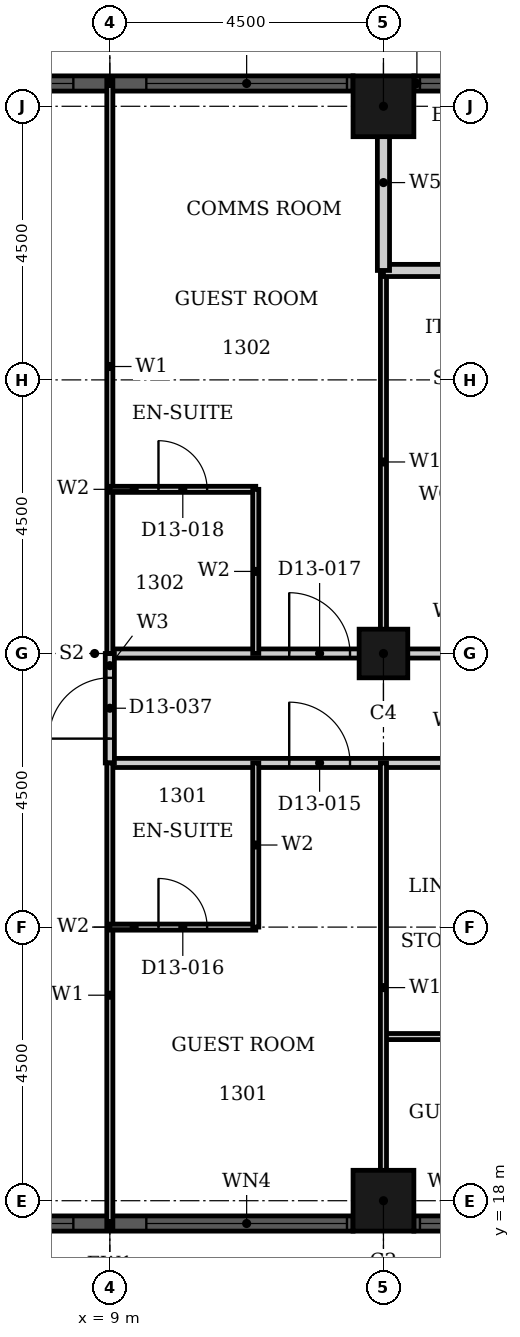
"""IFC4 building model, lengths in metres.
Left out: names, types, materials, properties, quantities, classifications, styles, units other than length and angle.
Written with IfcOpenShell. Run it as: python <this file> out.ifc"""

import sys

from ifc_helpers import new_model, si_unit, direction, frame, frame_2d, origin, origin_2d, place, context, subcontext, project, spatial, rectangle, hollow_rectangle, extrude, element, fill, save


model = new_model("IFC4")
c1 = context("Model", 3, precision=1e-05, world=origin(), true_north=direction((0.0, 1.0)))
c2 = subcontext(c1, "Body", "Model", "MODEL_VIEW")
j1 = project(units=[si_unit("LENGTHUNIT", "METRE"), si_unit("PLANEANGLEUNIT", "RADIAN")], contexts=[c1])
p1 = place(None, origin())
s1 = spatial("IfcSite", under=j1, at=p1, CompositionType="ELEMENT")
p2 = place(p1, origin())
s2 = spatial("IfcBuilding", under=s1, at=p2, CompositionType="ELEMENT")
p3 = place(p2, frame((0.0, 0.0, 60.0)))
s3 = spatial("IfcBuildingStorey", under=s2, at=p3, CompositionType="ELEMENT", Elevation=60.0)
for number, where, z_axis, x_axis in (
    (1, (13.5, 36.0, 0.0), (0.0, 0.0, 1.0), (1.0, 0.0, 0.0)),
    (2, (13.5, 18.0, 0.0), (0.0, 0.0, 1.0), (1.0, 0.0, 0.0)),
):
    element("IfcColumn", number, at=place(p3, frame(where, z_axis=z_axis, x_axis=x_axis)), inside=s3, PredefinedType="COLUMN", context=c2, shape_type="SweptSolid", body=[
        extrude(hollow_rectangle(XDim=1.0, YDim=1.0, WallThickness=0.032, at=origin_2d()), origin(), (0.0, 0.0, 1.0), 3.6),
    ])
p4 = place(p3, frame((13.5, 27.0, 0.0), z_axis=(0.0, 0.0, 1.0), x_axis=(1.0, 0.0, 0.0)))
e3 = element("IfcColumn", 3, at=p4, inside=s3, PredefinedType="COLUMN", context=c2, shape_type="SweptSolid", body=[
    extrude(hollow_rectangle(XDim=0.8, YDim=0.8, WallThickness=0.025, at=origin_2d()), origin(), (0.0, 0.0, 1.0), 3.6),
])
p5 = place(p3, frame((15.25, 36.375, 0.0), z_axis=(0.0, 0.0, 1.0), x_axis=(-1.0, 0.0, 0.0)))
e4 = element("IfcWall", 4, at=p5, inside=s3, PredefinedType="SOLIDWALL", context=c2, shape_type="SweptSolid", body=[
    extrude(rectangle(XDim=1.25, YDim=0.25, at=frame_2d((0.625, 0.0))), origin(), (0.0, 0.0, 1.0), 3.6),
])
p6 = place(p5, frame((0.1, 0.0, 0.9)))
e5 = element("IfcOpeningElement", 5, at=p6, cuts=e4, PredefinedType="OPENING", context=c2, shape_type="SweptSolid", body=[
    extrude(rectangle(XDim=1.05, YDim=2.08, at=frame_2d((0.525, 1.04))), frame((0.0, 0.135, 0.0), z_axis=(0.0, -1.0, 0.0), x_axis=(1.0, 0.0, 0.0)), (0.0, 0.0, 1.0), 0.27),
])
p7 = place(p3, frame((13.0, 36.375, 0.0), z_axis=(0.0, 0.0, 1.0), x_axis=(-1.0, 0.0, 0.0)))
e6 = element("IfcWall", 6, at=p7, inside=s3, PredefinedType="SOLIDWALL", context=c2, shape_type="SweptSolid", body=[
    extrude(rectangle(XDim=8.0, YDim=0.25, at=frame_2d((4.0, 0.0))), origin(), (0.0, 0.0, 1.0), 3.6),
])
p8 = place(p7, frame((0.1, 0.0, 0.9)))
e7 = element("IfcOpeningElement", 7, at=p8, cuts=e6, PredefinedType="OPENING", context=c2, shape_type="SweptSolid", body=[
    extrude(rectangle(XDim=3.3, YDim=2.08, at=frame_2d((1.65, 1.04))), frame((0.0, 0.135, 0.0), z_axis=(0.0, -1.0, 0.0), x_axis=(1.0, 0.0, 0.0)), (0.0, 0.0, 1.0), 0.27),
])
p9 = place(p7, frame((4.6, 0.0, 0.9)))
e8 = element("IfcOpeningElement", 8, at=p9, cuts=e6, PredefinedType="OPENING", context=c2, shape_type="SweptSolid", body=[
    extrude(rectangle(XDim=3.3, YDim=2.08, at=frame_2d((1.65, 1.04))), frame((0.0, 0.135, 0.0), z_axis=(0.0, -1.0, 0.0), x_axis=(1.0, 0.0, 0.0)), (0.0, 0.0, 1.0), 0.27),
])
p10 = place(p3, frame((5.0, 17.625, 0.0), z_axis=(0.0, 0.0, 1.0), x_axis=(1.0, 0.0, 0.0)))
e9 = element("IfcWall", 9, at=p10, inside=s3, PredefinedType="SOLIDWALL", context=c2, shape_type="SweptSolid", body=[
    extrude(rectangle(XDim=8.0, YDim=0.25, at=frame_2d((4.0, 0.0))), origin(), (0.0, 0.0, 1.0), 3.6),
])
p11 = place(p10, frame((0.1, 0.0, 0.9)))
e10 = element("IfcOpeningElement", 10, at=p11, cuts=e9, PredefinedType="OPENING", context=c2, shape_type="SweptSolid", body=[
    extrude(rectangle(XDim=3.3, YDim=2.08, at=frame_2d((1.65, 1.04))), frame((0.0, 0.135, 0.0), z_axis=(0.0, -1.0, 0.0), x_axis=(1.0, 0.0, 0.0)), (0.0, 0.0, 1.0), 0.27),
])
p12 = place(p10, frame((4.6, 0.0, 0.9)))
e11 = element("IfcOpeningElement", 11, at=p12, cuts=e9, PredefinedType="OPENING", context=c2, shape_type="SweptSolid", body=[
    extrude(rectangle(XDim=3.3, YDim=2.08, at=frame_2d((1.65, 1.04))), frame((0.0, 0.135, 0.0), z_axis=(0.0, -1.0, 0.0), x_axis=(1.0, 0.0, 0.0)), (0.0, 0.0, 1.0), 0.27),
])
p13 = place(p3, frame((14.0, 17.625, 0.0), z_axis=(0.0, 0.0, 1.0), x_axis=(1.0, 0.0, 0.0)))
e12 = element("IfcWall", 12, at=p13, inside=s3, PredefinedType="SOLIDWALL", context=c2, shape_type="SweptSolid", body=[
    extrude(rectangle(XDim=1.25, YDim=0.25, at=frame_2d((0.625, 0.0))), origin(), (0.0, 0.0, 1.0), 3.6),
])
p14 = place(p13, frame((0.1, 0.0, 0.9)))
e13 = element("IfcOpeningElement", 13, at=p14, cuts=e12, PredefinedType="OPENING", context=c2, shape_type="SweptSolid", body=[
    extrude(rectangle(XDim=1.05, YDim=2.08, at=frame_2d((0.525, 1.04))), frame((0.0, 0.135, 0.0), z_axis=(0.0, -1.0, 0.0), x_axis=(1.0, 0.0, 0.0)), (0.0, 0.0, 1.0), 0.27),
])
p15 = place(p3, frame((9.0, 25.2, 0.0), z_axis=(0.0, 0.0, 1.0), x_axis=(1.0, 0.0, 0.0)))
e14 = element("IfcWall", 14, at=p15, inside=s3, PredefinedType="PARTITIONING", context=c2, shape_type="SweptSolid", body=[
    extrude(rectangle(XDim=7.2, YDim=0.15, at=frame_2d((3.6, 0.0))), origin(), (0.0, 0.0, 1.0), 3.3),
])
p16 = place(p15, frame((2.95, 0.0, 0.0)))
e15 = element("IfcOpeningElement", 15, at=p16, cuts=e14, PredefinedType="OPENING", context=c2, shape_type="SweptSolid", body=[
    extrude(rectangle(XDim=1.0, YDim=2.1, at=frame_2d((0.5, 1.05))), frame((0.0, 0.085, 0.0), z_axis=(0.0, -1.0, 0.0), x_axis=(1.0, 0.0, 0.0)), (0.0, 0.0, 1.0), 0.17),
])
p17 = place(p3, frame((9.0, 27.0, 0.0), z_axis=(0.0, 0.0, 1.0), x_axis=(1.0, 0.0, 0.0)))
e16 = element("IfcWall", 16, at=p17, inside=s3, PredefinedType="PARTITIONING", context=c2, shape_type="SweptSolid", body=[
    extrude(rectangle(XDim=7.2, YDim=0.15, at=frame_2d((3.6, 0.0))), origin(), (0.0, 0.0, 1.0), 2.58),
])
p18 = place(p17, frame((2.95, 0.0, 0.0)))
e17 = element("IfcOpeningElement", 17, at=p18, cuts=e16, PredefinedType="OPENING", context=c2, shape_type="SweptSolid", body=[
    extrude(rectangle(XDim=1.0, YDim=2.1, at=frame_2d((0.5, 1.05))), frame((0.0, 0.085, 0.0), z_axis=(0.0, -1.0, 0.0), x_axis=(1.0, 0.0, 0.0)), (0.0, 0.0, 1.0), 0.17),
])
p19 = place(p3, frame((9.0, 25.2, 0.0), z_axis=(0.0, 0.0, 1.0), x_axis=(0.0, 1.0, 0.0)))
e18 = element("IfcWall", 18, at=p19, inside=s3, PredefinedType="PARTITIONING", context=c2, shape_type="SweptSolid", body=[
    extrude(rectangle(XDim=1.8, YDim=0.15, at=frame_2d((0.9, 0.0))), origin(), (0.0, 0.0, 1.0), 3.3),
])
p20 = place(p19, frame((0.4, 0.0, 0.0)))
e19 = element("IfcOpeningElement", 19, at=p20, cuts=e18, PredefinedType="OPENING", context=c2, shape_type="SweptSolid", body=[
    extrude(rectangle(XDim=1.0, YDim=2.1, at=frame_2d((0.5, 1.05))), frame((0.0, 0.085, 0.0), z_axis=(0.0, -1.0, 0.0), x_axis=(1.0, 0.0, 0.0)), (0.0, 0.0, 1.0), 0.17),
])
p21 = place(p3, frame((13.5, 20.7, 0.0), z_axis=(0.0, 0.0, 1.0), x_axis=(1.0, 0.0, 0.0)))
e20 = element("IfcWall", 20, at=p21, inside=s3, PredefinedType="PARTITIONING", context=c2, shape_type="SweptSolid", body=[
    extrude(rectangle(XDim=2.7, YDim=0.1, at=frame_2d((1.35, 0.0))), origin(), (0.0, 0.0, 1.0), 3.3),
])
p22 = place(p3, frame((13.5, 27.0, 0.0), z_axis=(0.0, 0.0, 1.0), x_axis=(0.0, 1.0, 0.0)))
e21 = element("IfcWall", 21, at=p22, inside=s3, PredefinedType="PARTITIONING", context=c2, shape_type="SweptSolid", body=[
    extrude(rectangle(XDim=6.3, YDim=0.1, at=frame_2d((3.15, 0.0))), origin(), (0.0, 0.0, 1.0), 2.38),
])
p23 = place(p3, frame((13.5, 17.81, 0.0), z_axis=(0.0, 0.0, 1.0), x_axis=(0.0, 1.0, 0.0)))
e22 = element("IfcWall", 22, at=p23, inside=s3, PredefinedType="PARTITIONING", context=c2, shape_type="SweptSolid", body=[
    extrude(rectangle(XDim=7.39, YDim=0.1, at=frame_2d((3.695, 0.0))), origin(), (0.0, 0.0, 1.0), 2.38),
])
p24 = place(p3, frame((9.0, 27.0, 0.0), z_axis=(0.0, 0.0, 1.0), x_axis=(0.0, 1.0, 0.0)))
e23 = element("IfcWall", 23, at=p24, inside=s3, PredefinedType="PARTITIONING", context=c2, shape_type="SweptSolid", body=[
    extrude(rectangle(XDim=9.44, YDim=0.1, at=frame_2d((4.72, 0.0))), origin(), (0.0, 0.0, 1.0), 3.3),
])
p25 = place(p3, frame((9.0, 17.56, 0.0), z_axis=(0.0, 0.0, 1.0), x_axis=(0.0, 1.0, 0.0)))
e24 = element("IfcWall", 24, at=p25, inside=s3, PredefinedType="PARTITIONING", context=c2, shape_type="SweptSolid", body=[
    extrude(rectangle(XDim=7.64, YDim=0.1, at=frame_2d((3.82, 0.0))), origin(), (0.0, 0.0, 1.0), 3.3),
])
p26 = place(p3, frame((9.0, 22.5, 0.0), z_axis=(0.0, 0.0, 1.0), x_axis=(1.0, 0.0, 0.0)))
e25 = element("IfcWall", 25, at=p26, inside=s3, PredefinedType="PARTITIONING", context=c2, shape_type="SweptSolid", body=[
    extrude(rectangle(XDim=2.4, YDim=0.1, at=frame_2d((1.2, 0.0))), origin(), (0.0, 0.0, 1.0), 2.58),
])
p27 = place(p26, frame((0.8, 0.0, 0.0)))
e26 = element("IfcOpeningElement", 26, at=p27, cuts=e25, PredefinedType="OPENING", context=c2, shape_type="SweptSolid", body=[
    extrude(rectangle(XDim=0.8, YDim=2.1, at=frame_2d((0.4, 1.05))), frame((0.0, 0.06, 0.0), z_axis=(0.0, -1.0, 0.0), x_axis=(1.0, 0.0, 0.0)), (0.0, 0.0, 1.0), 0.12),
])
p28 = place(p3, frame((9.0, 29.7, 0.0), z_axis=(0.0, 0.0, 1.0), x_axis=(1.0, 0.0, 0.0)))
e27 = element("IfcWall", 27, at=p28, inside=s3, PredefinedType="PARTITIONING", context=c2, shape_type="SweptSolid", body=[
    extrude(rectangle(XDim=2.4, YDim=0.1, at=frame_2d((1.2, 0.0))), origin(), (0.0, 0.0, 1.0), 3.3),
])
p29 = place(p28, frame((0.8, 0.0, 0.0)))
e28 = element("IfcOpeningElement", 28, at=p29, cuts=e27, PredefinedType="OPENING", context=c2, shape_type="SweptSolid", body=[
    extrude(rectangle(XDim=0.8, YDim=2.1, at=frame_2d((0.4, 1.05))), frame((0.0, 0.06, 0.0), z_axis=(0.0, -1.0, 0.0), x_axis=(1.0, 0.0, 0.0)), (0.0, 0.0, 1.0), 0.12),
])
for number, where, z_axis, x_axis in (
    (29, (11.4, 27.0, 0.0), (0.0, 0.0, 1.0), (0.0, 1.0, 0.0)),
    (30, (11.4, 22.5, 0.0), (0.0, 0.0, 1.0), (0.0, 1.0, 0.0)),
):
    element("IfcWall", number, at=place(p3, frame(where, z_axis=z_axis, x_axis=x_axis)), inside=s3, PredefinedType="PARTITIONING", context=c2, shape_type="SweptSolid", body=[
        extrude(rectangle(XDim=2.7, YDim=0.1, at=frame_2d((1.35, 0.0))), origin(), (0.0, 0.0, 1.0), 3.3),
    ])
p30 = place(p3, frame((13.5, 33.3, 0.0), z_axis=(0.0, 0.0, 1.0), x_axis=(1.0, 0.0, 0.0)))
e31 = element("IfcWall", 31, at=p30, inside=s3, PredefinedType="PARTITIONING", context=c2, shape_type="SweptSolid", body=[
    extrude(rectangle(XDim=4.5, YDim=0.2, at=frame_2d((2.25, 0.0))), origin(), (0.0, 0.0, 1.0), 3.3),
])
p31 = place(p30, frame((3.15, 0.0, 0.0)))
e32 = element("IfcOpeningElement", 32, at=p31, cuts=e31, PredefinedType="OPENING", context=c2, shape_type="SweptSolid", body=[
    extrude(rectangle(XDim=0.9, YDim=2.1, at=frame_2d((0.45, 1.05))), frame((0.0, 0.11, 0.0), z_axis=(0.0, -1.0, 0.0), x_axis=(1.0, 0.0, 0.0)), (0.0, 0.0, 1.0), 0.22),
])
p32 = place(p3, frame((13.5, 33.3, 0.0), z_axis=(0.0, 0.0, 1.0), x_axis=(0.0, 1.0, 0.0)))
e33 = element("IfcWall", 33, at=p32, inside=s3, PredefinedType="PARTITIONING", context=c2, shape_type="SweptSolid", body=[
    extrude(rectangle(XDim=2.89, YDim=0.2, at=frame_2d((1.445, 0.0))), origin(), (0.0, 0.0, 1.0), 2.38),
])
p33 = place(p6, origin())
e34 = element("IfcWindow", 34, at=p33, inside=s3, PartitioningType="SINGLE_PANEL", PredefinedType="WINDOW", context=c2, shape_type="SweptSolid", body=[
    extrude(rectangle(XDim=1.05, YDim=2.08, at=frame_2d((0.525, 1.04))), frame((0.0, 0.03, 0.0), z_axis=(0.0, -1.0, 0.0), x_axis=(1.0, 0.0, 0.0)), (0.0, 0.0, 1.0), 0.06),
])
fill(e5, e34)
p34 = place(p8, origin())
e35 = element("IfcWindow", 35, at=p34, inside=s3, PartitioningType="SINGLE_PANEL", PredefinedType="WINDOW", context=c2, shape_type="SweptSolid", body=[
    extrude(rectangle(XDim=3.3, YDim=2.08, at=frame_2d((1.65, 1.04))), frame((0.0, 0.03, 0.0), z_axis=(0.0, -1.0, 0.0), x_axis=(1.0, 0.0, 0.0)), (0.0, 0.0, 1.0), 0.06),
])
fill(e7, e35)
p35 = place(p9, origin())
e36 = element("IfcWindow", 36, at=p35, inside=s3, PartitioningType="SINGLE_PANEL", PredefinedType="WINDOW", context=c2, shape_type="SweptSolid", body=[
    extrude(rectangle(XDim=3.3, YDim=2.08, at=frame_2d((1.65, 1.04))), frame((0.0, 0.03, 0.0), z_axis=(0.0, -1.0, 0.0), x_axis=(1.0, 0.0, 0.0)), (0.0, 0.0, 1.0), 0.06),
])
fill(e8, e36)
p36 = place(p11, origin())
e37 = element("IfcWindow", 37, at=p36, inside=s3, PartitioningType="SINGLE_PANEL", PredefinedType="WINDOW", context=c2, shape_type="SweptSolid", body=[
    extrude(rectangle(XDim=3.3, YDim=2.08, at=frame_2d((1.65, 1.04))), frame((0.0, 0.03, 0.0), z_axis=(0.0, -1.0, 0.0), x_axis=(1.0, 0.0, 0.0)), (0.0, 0.0, 1.0), 0.06),
])
fill(e10, e37)
p37 = place(p12, origin())
e38 = element("IfcWindow", 38, at=p37, inside=s3, PartitioningType="SINGLE_PANEL", PredefinedType="WINDOW", context=c2, shape_type="SweptSolid", body=[
    extrude(rectangle(XDim=3.3, YDim=2.08, at=frame_2d((1.65, 1.04))), frame((0.0, 0.03, 0.0), z_axis=(0.0, -1.0, 0.0), x_axis=(1.0, 0.0, 0.0)), (0.0, 0.0, 1.0), 0.06),
])
fill(e11, e38)
p38 = place(p14, origin())
e39 = element("IfcWindow", 39, at=p38, inside=s3, PartitioningType="SINGLE_PANEL", PredefinedType="WINDOW", context=c2, shape_type="SweptSolid", body=[
    extrude(rectangle(XDim=1.05, YDim=2.08, at=frame_2d((0.525, 1.04))), frame((0.0, 0.03, 0.0), z_axis=(0.0, -1.0, 0.0), x_axis=(1.0, 0.0, 0.0)), (0.0, 0.0, 1.0), 0.06),
])
fill(e13, e39)
p39 = place(p16, origin())
e40 = element("IfcDoor", 40, at=p39, inside=s3, OperationType="SINGLE_SWING_RIGHT", PredefinedType="DOOR", context=c2, shape_type="SweptSolid", body=[
    extrude(rectangle(XDim=1.0, YDim=2.1, at=frame_2d((0.5, 1.05))), frame((0.0, 0.025, 0.0), z_axis=(0.0, -1.0, 0.0), x_axis=(1.0, 0.0, 0.0)), (0.0, 0.0, 1.0), 0.05),
])
fill(e15, e40)
p40 = place(p27, origin())
e41 = element("IfcDoor", 41, at=p40, inside=s3, OperationType="SINGLE_SWING_RIGHT", PredefinedType="DOOR", context=c2, shape_type="SweptSolid", body=[
    extrude(rectangle(XDim=0.8, YDim=2.1, at=frame_2d((0.4, 1.05))), frame((0.0, 0.025, 0.0), z_axis=(0.0, -1.0, 0.0), x_axis=(1.0, 0.0, 0.0)), (0.0, 0.0, 1.0), 0.05),
])
fill(e26, e41)
p41 = place(p18, origin())
e42 = element("IfcDoor", 42, at=p41, inside=s3, OperationType="SINGLE_SWING_RIGHT", PredefinedType="DOOR", context=c2, shape_type="SweptSolid", body=[
    extrude(rectangle(XDim=1.0, YDim=2.1, at=frame_2d((0.5, 1.05))), frame((0.0, 0.025, 0.0), z_axis=(0.0, -1.0, 0.0), x_axis=(1.0, 0.0, 0.0)), (0.0, 0.0, 1.0), 0.05),
])
fill(e17, e42)
p42 = place(p29, origin())
e43 = element("IfcDoor", 43, at=p42, inside=s3, OperationType="SINGLE_SWING_LEFT", PredefinedType="DOOR", context=c2, shape_type="SweptSolid", body=[
    extrude(rectangle(XDim=0.8, YDim=2.1, at=frame_2d((0.4, 1.05))), frame((0.0, 0.025, 0.0), z_axis=(0.0, -1.0, 0.0), x_axis=(1.0, 0.0, 0.0)), (0.0, 0.0, 1.0), 0.05),
])
fill(e28, e43)
p43 = place(p20, origin())
e44 = element("IfcDoor", 44, at=p43, inside=s3, OperationType="SINGLE_SWING_RIGHT", PredefinedType="DOOR", context=c2, shape_type="SweptSolid", body=[
    extrude(rectangle(XDim=1.0, YDim=2.1, at=frame_2d((0.5, 1.05))), frame((0.0, 0.025, 0.0), z_axis=(0.0, -1.0, 0.0), x_axis=(1.0, 0.0, 0.0)), (0.0, 0.0, 1.0), 0.05),
])
fill(e19, e44)
save(model, sys.argv[1])
